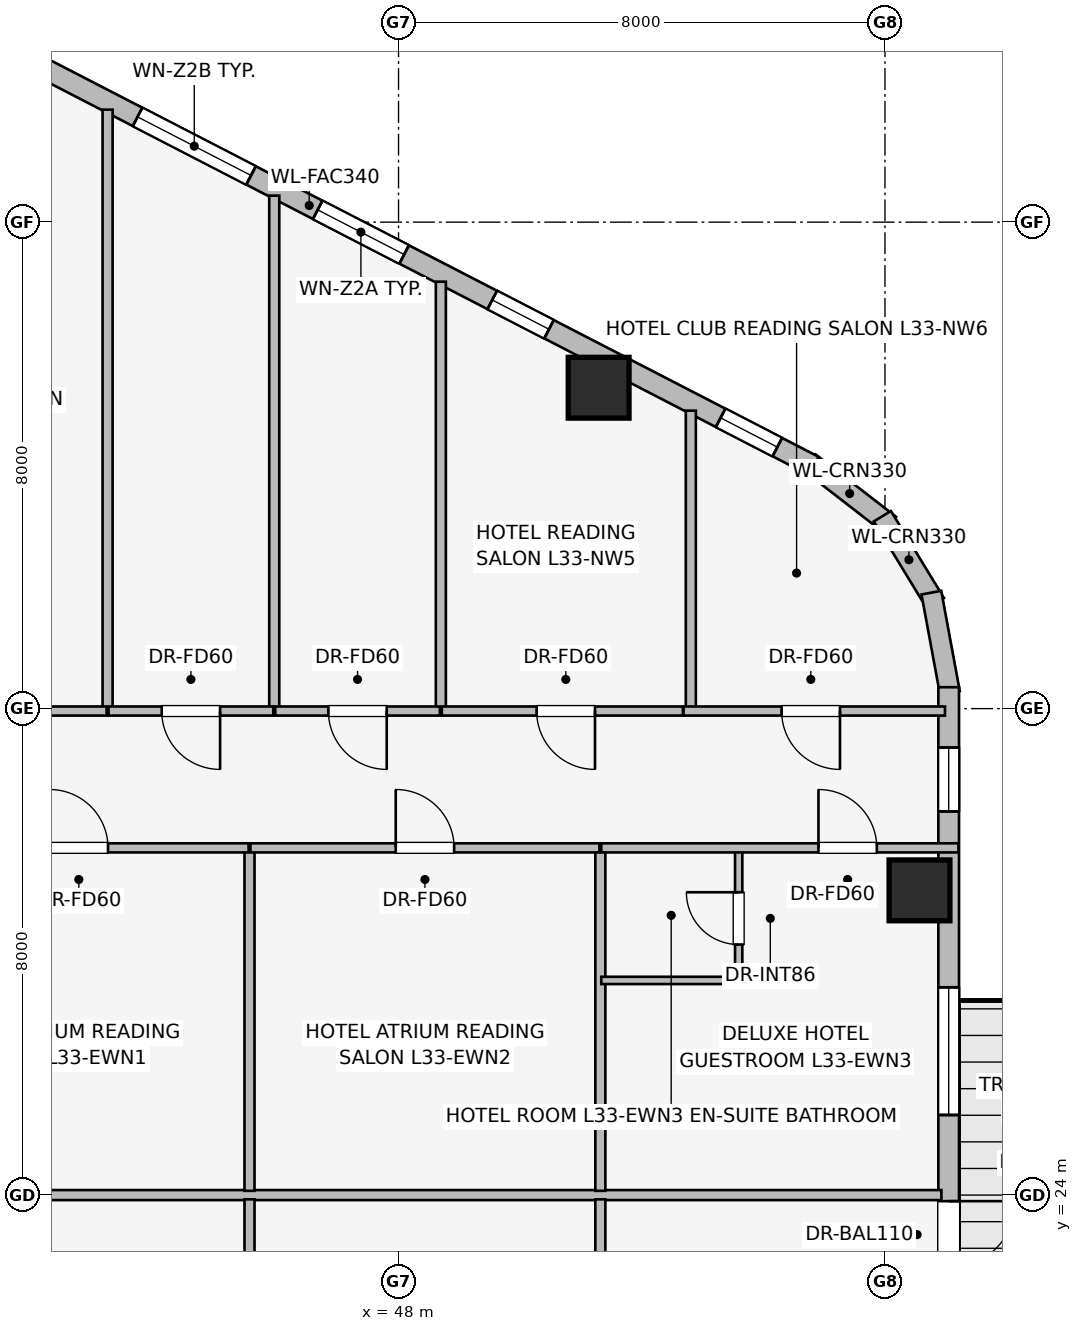
"""IFC4 building model, lengths in metres.
Left out: names, types, materials, properties, quantities, classifications, styles, units other than length and angle.
Written with IfcOpenShell. Run it as: python <this file> out.ifc"""

import sys

from ifc_helpers import new_model, si_unit, direction, frame, frame_2d, origin, origin_2d, place, context, subcontext, project, spatial, rectangle, extrude, element, fill, save


model = new_model("IFC4")
c1 = context("Model", 3, precision=1e-05, world=origin(), true_north=direction((0.0, 1.0)))
c2 = subcontext(c1, "Body", "Model", "MODEL_VIEW")
j1 = project(units=[si_unit("LENGTHUNIT", "METRE"), si_unit("PLANEANGLEUNIT", "RADIAN")], contexts=[c1])
p1 = place(None, origin())
s1 = spatial("IfcSite", under=j1, at=p1, CompositionType="ELEMENT")
p2 = place(p1, origin())
s2 = spatial("IfcBuilding", under=s1, at=p2, CompositionType="ELEMENT")
p3 = place(p2, frame((0.0, 0.0, 125.7)))
s3 = spatial("IfcBuildingStorey", under=s2, at=p3, CompositionType="ELEMENT", Elevation=125.7)
for number, where, z_axis, x_axis in (
    (1, (51.291, 37.277, 0.0), (0.0, 0.0, 1.0), (1.0, 0.0, 0.0)),
    (2, (56.568, 29.011, 0.0), (0.0, 0.0, 1.0), (1.0, 0.0, 0.0)),
):
    element("IfcColumn", number, at=place(p3, frame(where, z_axis=z_axis, x_axis=x_axis)), inside=s3, PredefinedType="COLUMN", context=c2, shape_type="SweptSolid", body=[
        extrude(rectangle(XDim=1.0, YDim=1.0, at=origin_2d()), origin(), (0.0, 0.0, 1.0), 3.45),
    ])
p4 = place(p3, frame((54.757, 36.05, 0.0), z_axis=(0.0, 0.0, 1.0), x_axis=(0.790621329885, -0.612305408053, 0.0)))
e3 = element("IfcWall", 3, at=p4, inside=s3, PredefinedType="STANDARD", context=c2, shape_type="SweptSolid", body=[
    extrude(rectangle(XDim=1.676, YDim=0.33, at=frame_2d((0.838, 0.0))), origin(), (0.0, 0.0, 1.0), 3.19),
])
p5 = place(p3, frame((55.957, 35.164, 0.0), z_axis=(0.0, 0.0, 1.0), x_axis=(0.520519429557, -0.853849824883, 0.0)))
e4 = element("IfcWall", 4, at=p5, inside=s3, PredefinedType="STANDARD", context=c2, shape_type="SweptSolid", body=[
    extrude(rectangle(XDim=1.677, YDim=0.33, at=frame_2d((0.839, 0.0))), origin(), (0.0, 0.0, 1.0), 3.19),
])
p6 = place(p3, frame((56.763, 33.907, 0.0), z_axis=(0.0, 0.0, 1.0), x_axis=(0.181984991895, -0.983301308209, 0.0)))
e5 = element("IfcWall", 5, at=p6, inside=s3, PredefinedType="STANDARD", context=c2, shape_type="SweptSolid", body=[
    extrude(rectangle(XDim=1.677, YDim=0.33, at=frame_2d((0.838, 0.0))), origin(), (0.0, 0.0, 1.0), 3.19),
])
p7 = place(p3, frame((38.231, 44.558, 0.0), z_axis=(0.0, 0.0, 1.0), x_axis=(0.888613612362, -0.458656568606, 0.0)))
e6 = element("IfcWall", 6, at=p7, inside=s3, PredefinedType="STANDARD", context=c2, shape_type="SweptSolid", body=[
    extrude(rectangle(XDim=18.681, YDim=0.34, at=frame_2d((9.34, 0.0))), origin(), (0.0, 0.0, 1.0), 3.19),
])
p8 = place(p7, frame((1.727, 0.0, 0.75)))
e7 = element("IfcOpeningElement", 7, at=p8, cuts=e6, PredefinedType="OPENING", context=c2, shape_type="SweptSolid", body=[
    extrude(rectangle(XDim=1.05, YDim=1.4, at=frame_2d((0.525, 0.7))), frame((0.0, 0.18, 0.0), z_axis=(0.0, -1.0, 0.0), x_axis=(1.0, 0.0, 0.0)), (0.0, 0.0, 1.0), 0.36),
])
p9 = place(p7, frame((6.163, 0.0, 0.75)))
e8 = element("IfcOpeningElement", 8, at=p9, cuts=e6, PredefinedType="OPENING", context=c2, shape_type="SweptSolid", body=[
    extrude(rectangle(XDim=2.1, YDim=1.5, at=frame_2d((1.05, 0.75))), frame((0.0, 0.18, 0.0), z_axis=(0.0, -1.0, 0.0), x_axis=(1.0, 0.0, 0.0)), (0.0, 0.0, 1.0), 0.36),
])
p10 = place(p7, frame((9.497, 0.0, 0.75)))
e9 = element("IfcOpeningElement", 9, at=p10, cuts=e6, PredefinedType="OPENING", context=c2, shape_type="SweptSolid", body=[
    extrude(rectangle(XDim=1.6, YDim=1.55, at=frame_2d((0.8, 0.775))), frame((0.0, 0.18, 0.0), z_axis=(0.0, -1.0, 0.0), x_axis=(1.0, 0.0, 0.0)), (0.0, 0.0, 1.0), 0.36),
])
p11 = place(p7, frame((12.728, 0.0, 0.75)))
e10 = element("IfcOpeningElement", 10, at=p11, cuts=e6, PredefinedType="OPENING", context=c2, shape_type="SweptSolid", body=[
    extrude(rectangle(XDim=1.05, YDim=1.4, at=frame_2d((0.525, 0.7))), frame((0.0, 0.18, 0.0), z_axis=(0.0, -1.0, 0.0), x_axis=(1.0, 0.0, 0.0)), (0.0, 0.0, 1.0), 0.36),
])
p12 = place(p7, frame((16.954, 0.0, 0.75)))
e11 = element("IfcOpeningElement", 11, at=p12, cuts=e6, PredefinedType="OPENING", context=c2, shape_type="SweptSolid", body=[
    extrude(rectangle(XDim=1.05, YDim=1.4, at=frame_2d((0.525, 0.7))), frame((0.0, 0.18, 0.0), z_axis=(0.0, -1.0, 0.0), x_axis=(1.0, 0.0, 0.0)), (0.0, 0.0, 1.0), 0.36),
])
p13 = place(p3, frame((57.048, 32.352, 0.0), z_axis=(0.0, 0.0, 1.0), x_axis=(0.0, -1.0, 0.0)))
e12 = element("IfcWall", 12, at=p13, inside=s3, PredefinedType="STANDARD", context=c2, shape_type="SweptSolid", body=[
    extrude(rectangle(XDim=16.704, YDim=0.34, at=frame_2d((8.352, 0.0))), origin(), (0.0, 0.0, 1.0), 3.19),
])
p14 = place(p13, frame((8.452, 0.0, 0.0)))
e13 = element("IfcOpeningElement", 13, at=p14, cuts=e12, PredefinedType="OPENING", context=c2, shape_type="SweptSolid", body=[
    extrude(rectangle(XDim=1.1, YDim=2.04, at=frame_2d((0.55, 1.02))), frame((0.0, 0.18, 0.0), z_axis=(0.0, -1.0, 0.0), x_axis=(1.0, 0.0, 0.0)), (0.0, 0.0, 1.0), 0.36),
])
p15 = place(p13, frame((0.992, 0.0, 0.75)))
e14 = element("IfcOpeningElement", 14, at=p15, cuts=e12, PredefinedType="OPENING", context=c2, shape_type="SweptSolid", body=[
    extrude(rectangle(XDim=1.05, YDim=1.4, at=frame_2d((0.525, 0.7))), frame((0.0, 0.18, 0.0), z_axis=(0.0, -1.0, 0.0), x_axis=(1.0, 0.0, 0.0)), (0.0, 0.0, 1.0), 0.36),
])
p16 = place(p13, frame((4.935, 0.0, 0.75)))
e15 = element("IfcOpeningElement", 15, at=p16, cuts=e12, PredefinedType="OPENING", context=c2, shape_type="SweptSolid", body=[
    extrude(rectangle(XDim=2.1, YDim=1.5, at=frame_2d((1.05, 0.75))), frame((0.0, 0.18, 0.0), z_axis=(0.0, -1.0, 0.0), x_axis=(1.0, 0.0, 0.0)), (0.0, 0.0, 1.0), 0.36),
])
p17 = place(p13, frame((10.497, 0.0, 0.75)))
e16 = element("IfcOpeningElement", 16, at=p17, cuts=e12, PredefinedType="OPENING", context=c2, shape_type="SweptSolid", body=[
    extrude(rectangle(XDim=1.6, YDim=1.55, at=frame_2d((0.8, 0.775))), frame((0.0, 0.18, 0.0), z_axis=(0.0, -1.0, 0.0), x_axis=(1.0, 0.0, 0.0)), (0.0, 0.0, 1.0), 0.36),
])
p18 = place(p13, frame((14.702, 0.0, 0.75)))
e17 = element("IfcOpeningElement", 17, at=p18, cuts=e12, PredefinedType="OPENING", context=c2, shape_type="SweptSolid", body=[
    extrude(rectangle(XDim=1.05, YDim=1.4, at=frame_2d((0.525, 0.7))), frame((0.0, 0.18, 0.0), z_axis=(0.0, -1.0, 0.0), x_axis=(1.0, 0.0, 0.0)), (0.0, 0.0, 1.0), 0.36),
])
p19 = place(p3, frame((43.215, 31.97, 0.0), z_axis=(0.0, 0.0, 1.0), x_axis=(0.0, 1.0, 0.0)))
e18 = element("IfcWall", 18, at=p19, inside=s3, PredefinedType="PARTITIONING", context=c2, shape_type="SweptSolid", body=[
    extrude(rectangle(XDim=9.88, YDim=0.165, at=frame_2d((4.94, 0.0))), origin(), (0.0, 0.0, 1.0), 3.19),
])
p20 = place(p3, frame((45.956, 31.97, 0.0), z_axis=(0.0, 0.0, 1.0), x_axis=(0.0, 1.0, 0.0)))
e19 = element("IfcWall", 19, at=p20, inside=s3, PredefinedType="PARTITIONING", context=c2, shape_type="SweptSolid", body=[
    extrude(rectangle(XDim=8.466, YDim=0.165, at=frame_2d((4.233, 0.0))), origin(), (0.0, 0.0, 1.0), 3.19),
])
p21 = place(p3, frame((48.696, 31.97, 0.0), z_axis=(0.0, 0.0, 1.0), x_axis=(0.0, 1.0, 0.0)))
e20 = element("IfcWall", 20, at=p21, inside=s3, PredefinedType="PARTITIONING", context=c2, shape_type="SweptSolid", body=[
    extrude(rectangle(XDim=7.051, YDim=0.165, at=frame_2d((3.525, 0.0))), origin(), (0.0, 0.0, 1.0), 3.19),
])
p22 = place(p3, frame((52.807, 31.97, 0.0), z_axis=(0.0, 0.0, 1.0), x_axis=(0.0, 1.0, 0.0)))
e21 = element("IfcWall", 21, at=p22, inside=s3, PredefinedType="PARTITIONING", context=c2, shape_type="SweptSolid", body=[
    extrude(rectangle(XDim=4.93, YDim=0.165, at=frame_2d((2.465, 0.0))), origin(), (0.0, 0.0, 1.0), 3.19),
])
p23 = place(p3, frame((43.199, 31.96, 0.0), z_axis=(0.0, 0.0, 1.0), x_axis=(-1.0, 0.0, 0.0)))
e22 = element("IfcWall", 22, at=p23, inside=s3, PredefinedType="PARTITIONING", context=c2, shape_type="SweptSolid", body=[
    extrude(rectangle(XDim=3.965, YDim=0.15, at=frame_2d((1.982, 0.0))), origin(), (0.0, 0.0, 1.0), 3.19),
])
p24 = place(p23, frame((1.56, 0.0, 0.0)))
e23 = element("IfcOpeningElement", 23, at=p24, cuts=e22, PredefinedType="OPENING", context=c2, shape_type="SweptSolid", body=[
    extrude(rectangle(XDim=0.96, YDim=2.0, at=frame_2d((0.48, 1.0))), frame((0.0, 0.085, 0.0), z_axis=(0.0, -1.0, 0.0), x_axis=(1.0, 0.0, 0.0)), (0.0, 0.0, 1.0), 0.17),
])
p25 = place(p3, frame((45.94, 31.96, 0.0), z_axis=(0.0, 0.0, 1.0), x_axis=(-1.0, 0.0, 0.0)))
e24 = element("IfcWall", 24, at=p25, inside=s3, PredefinedType="PARTITIONING", context=c2, shape_type="SweptSolid", body=[
    extrude(rectangle(XDim=2.709, YDim=0.15, at=frame_2d((1.354, 0.0))), origin(), (0.0, 0.0, 1.0), 3.19),
])
p26 = place(p25, frame((0.875, 0.0, 0.0)))
e25 = element("IfcOpeningElement", 25, at=p26, cuts=e24, PredefinedType="OPENING", context=c2, shape_type="SweptSolid", body=[
    extrude(rectangle(XDim=0.96, YDim=2.0, at=frame_2d((0.48, 1.0))), frame((0.0, 0.085, 0.0), z_axis=(0.0, -1.0, 0.0), x_axis=(1.0, 0.0, 0.0)), (0.0, 0.0, 1.0), 0.17),
])
p27 = place(p3, frame((48.68, 31.96, 0.0), z_axis=(0.0, 0.0, 1.0), x_axis=(-1.0, 0.0, 0.0)))
e26 = element("IfcWall", 26, at=p27, inside=s3, PredefinedType="PARTITIONING", context=c2, shape_type="SweptSolid", body=[
    extrude(rectangle(XDim=2.708, YDim=0.15, at=frame_2d((1.354, 0.0))), origin(), (0.0, 0.0, 1.0), 3.19),
])
p28 = place(p27, frame((0.874, 0.0, 0.0)))
e27 = element("IfcOpeningElement", 27, at=p28, cuts=e26, PredefinedType="OPENING", context=c2, shape_type="SweptSolid", body=[
    extrude(rectangle(XDim=0.96, YDim=2.0, at=frame_2d((0.48, 1.0))), frame((0.0, 0.085, 0.0), z_axis=(0.0, -1.0, 0.0), x_axis=(1.0, 0.0, 0.0)), (0.0, 0.0, 1.0), 0.17),
])
p29 = place(p3, frame((52.677, 31.96, 0.0), z_axis=(0.0, 0.0, 1.0), x_axis=(-1.0, 0.0, 0.0)))
e28 = element("IfcWall", 28, at=p29, inside=s3, PredefinedType="PARTITIONING", context=c2, shape_type="SweptSolid", body=[
    extrude(rectangle(XDim=3.965, YDim=0.15, at=frame_2d((1.982, 0.0))), origin(), (0.0, 0.0, 1.0), 3.19),
])
p30 = place(p29, frame((1.446, 0.0, 0.0)))
e29 = element("IfcOpeningElement", 29, at=p30, cuts=e28, PredefinedType="OPENING", context=c2, shape_type="SweptSolid", body=[
    extrude(rectangle(XDim=0.96, YDim=2.0, at=frame_2d((0.48, 1.0))), frame((0.0, 0.085, 0.0), z_axis=(0.0, -1.0, 0.0), x_axis=(1.0, 0.0, 0.0)), (0.0, 0.0, 1.0), 0.17),
])
p31 = place(p3, frame((56.987, 31.96, 0.0), z_axis=(0.0, 0.0, 1.0), x_axis=(-1.0, 0.0, 0.0)))
e30 = element("IfcWall", 30, at=p31, inside=s3, PredefinedType="PARTITIONING", context=c2, shape_type="SweptSolid", body=[
    extrude(rectangle(XDim=4.3, YDim=0.15, at=frame_2d((2.15, 0.0))), origin(), (0.0, 0.0, 1.0), 3.19),
])
p32 = place(p31, frame((1.727, 0.0, 0.0)))
e31 = element("IfcOpeningElement", 31, at=p32, cuts=e30, PredefinedType="OPENING", context=c2, shape_type="SweptSolid", body=[
    extrude(rectangle(XDim=0.96, YDim=2.0, at=frame_2d((0.48, 1.0))), frame((0.0, 0.085, 0.0), z_axis=(0.0, -1.0, 0.0), x_axis=(1.0, 0.0, 0.0)), (0.0, 0.0, 1.0), 0.17),
])
p33 = place(p3, frame((40.52, 24.0, 0.0), z_axis=(0.0, 0.0, 1.0), x_axis=(1.0, 0.0, 0.0)))
e32 = element("IfcWall", 32, at=p33, inside=s3, PredefinedType="PARTITIONING", context=c2, shape_type="SweptSolid", body=[
    extrude(rectangle(XDim=16.408, YDim=0.165, at=frame_2d((8.204, 0.0))), origin(), (0.0, 0.0, 1.0), 3.19),
])
for number, where, z_axis, x_axis in (
    (33, (45.549, 24.07, 0.0), (0.0, 0.0, 1.0), (0.0, 1.0, 0.0)),
    (34, (51.319, 24.07, 0.0), (0.0, 0.0, 1.0), (0.0, 1.0, 0.0)),
):
    element("IfcWall", number, at=place(p3, frame(where, z_axis=z_axis, x_axis=x_axis)), inside=s3, PredefinedType="PARTITIONING", context=c2, shape_type="SweptSolid", body=[
        extrude(rectangle(XDim=5.64, YDim=0.165, at=frame_2d((2.82, 0.0))), origin(), (0.0, 0.0, 1.0), 3.19),
    ])
p34 = place(p3, frame((39.95, 29.71, 0.0), z_axis=(0.0, 0.0, 1.0), x_axis=(1.0, 0.0, 0.0)))
e35 = element("IfcWall", 35, at=p34, inside=s3, PredefinedType="PARTITIONING", context=c2, shape_type="SweptSolid", body=[
    extrude(rectangle(XDim=5.584, YDim=0.15, at=frame_2d((2.792, 0.0))), origin(), (0.0, 0.0, 1.0), 3.19),
])
p35 = place(p34, frame((2.312, 0.0, 0.0)))
e36 = element("IfcOpeningElement", 36, at=p35, cuts=e35, PredefinedType="OPENING", context=c2, shape_type="SweptSolid", body=[
    extrude(rectangle(XDim=0.96, YDim=2.0, at=frame_2d((0.48, 1.0))), frame((0.0, 0.085, 0.0), z_axis=(0.0, -1.0, 0.0), x_axis=(1.0, 0.0, 0.0)), (0.0, 0.0, 1.0), 0.17),
])
p36 = place(p3, frame((45.564, 29.71, 0.0), z_axis=(0.0, 0.0, 1.0), x_axis=(1.0, 0.0, 0.0)))
e37 = element("IfcWall", 37, at=p36, inside=s3, PredefinedType="PARTITIONING", context=c2, shape_type="SweptSolid", body=[
    extrude(rectangle(XDim=5.74, YDim=0.15, at=frame_2d((2.87, 0.0))), origin(), (0.0, 0.0, 1.0), 3.19),
])
p37 = place(p36, frame((2.39, 0.0, 0.0)))
e38 = element("IfcOpeningElement", 38, at=p37, cuts=e37, PredefinedType="OPENING", context=c2, shape_type="SweptSolid", body=[
    extrude(rectangle(XDim=0.96, YDim=2.0, at=frame_2d((0.48, 1.0))), frame((0.0, 0.085, 0.0), z_axis=(0.0, -1.0, 0.0), x_axis=(1.0, 0.0, 0.0)), (0.0, 0.0, 1.0), 0.17),
])
p38 = place(p3, frame((53.594, 27.47, 0.0), z_axis=(0.0, 0.0, 1.0), x_axis=(0.0, 1.0, 0.0)))
e39 = element("IfcWall", 39, at=p38, inside=s3, PredefinedType="PARTITIONING", context=c2, shape_type="SweptSolid", body=[
    extrude(rectangle(XDim=2.24, YDim=0.12, at=frame_2d((1.12, 0.0))), origin(), (0.0, 0.0, 1.0), 3.19),
])
p39 = place(p38, frame((0.65, 0.0, 0.0)))
e40 = element("IfcOpeningElement", 40, at=p39, cuts=e39, PredefinedType="OPENING", context=c2, shape_type="SweptSolid", body=[
    extrude(rectangle(XDim=0.86, YDim=2.0, at=frame_2d((0.43, 1.0))), frame((0.0, 0.07, 0.0), z_axis=(0.0, -1.0, 0.0), x_axis=(1.0, 0.0, 0.0)), (0.0, 0.0, 1.0), 0.14),
])
p40 = place(p3, frame((51.334, 27.53, 0.0), z_axis=(0.0, 0.0, 1.0), x_axis=(1.0, 0.0, 0.0)))
e41 = element("IfcWall", 41, at=p40, inside=s3, PredefinedType="PARTITIONING", context=c2, shape_type="SweptSolid", body=[
    extrude(rectangle(XDim=2.32, YDim=0.12, at=frame_2d((1.16, 0.0))), origin(), (0.0, 0.0, 1.0), 3.19),
])
p41 = place(p3, frame((51.334, 29.71, 0.0), z_axis=(0.0, 0.0, 1.0), x_axis=(1.0, 0.0, 0.0)))
e42 = element("IfcWall", 42, at=p41, inside=s3, PredefinedType="PARTITIONING", context=c2, shape_type="SweptSolid", body=[
    extrude(rectangle(XDim=5.874, YDim=0.15, at=frame_2d((2.937, 0.0))), origin(), (0.0, 0.0, 1.0), 3.19),
])
p42 = place(p41, frame((3.572, 0.0, 0.0)))
e43 = element("IfcOpeningElement", 43, at=p42, cuts=e42, PredefinedType="OPENING", context=c2, shape_type="SweptSolid", body=[
    extrude(rectangle(XDim=0.96, YDim=2.0, at=frame_2d((0.48, 1.0))), frame((0.0, 0.085, 0.0), z_axis=(0.0, -1.0, 0.0), x_axis=(1.0, 0.0, 0.0)), (0.0, 0.0, 1.0), 0.17),
])
for number, where, z_axis, x_axis in (
    (44, (45.549, 18.29, 0.0), (0.0, 0.0, 1.0), (0.0, 1.0, 0.0)),
    (45, (51.319, 18.29, 0.0), (0.0, 0.0, 1.0), (0.0, 1.0, 0.0)),
):
    element("IfcWall", number, at=place(p3, frame(where, z_axis=z_axis, x_axis=x_axis)), inside=s3, PredefinedType="PARTITIONING", context=c2, shape_type="SweptSolid", body=[
        extrude(rectangle(XDim=5.64, YDim=0.165, at=frame_2d((2.82, 0.0))), origin(), (0.0, 0.0, 1.0), 3.19),
    ])
p43 = place(p9, origin())
e46 = element("IfcWindow", 46, at=p43, inside=s3, PartitioningType="SINGLE_PANEL", PredefinedType="WINDOW", context=c2, shape_type="SweptSolid", body=[
    extrude(rectangle(XDim=2.1, YDim=1.5, at=frame_2d((1.05, 0.75))), frame((0.0, 0.03, 0.0), z_axis=(0.0, -1.0, 0.0), x_axis=(1.0, 0.0, 0.0)), (0.0, 0.0, 1.0), 0.06),
])
fill(e8, e46)
p44 = place(p10, origin())
e47 = element("IfcWindow", 47, at=p44, inside=s3, PartitioningType="SINGLE_PANEL", PredefinedType="WINDOW", context=c2, shape_type="SweptSolid", body=[
    extrude(rectangle(XDim=1.6, YDim=1.55, at=frame_2d((0.8, 0.775))), frame((0.0, 0.03, 0.0), z_axis=(0.0, -1.0, 0.0), x_axis=(1.0, 0.0, 0.0)), (0.0, 0.0, 1.0), 0.06),
])
fill(e9, e47)
p45 = place(p11, origin())
e48 = element("IfcWindow", 48, at=p45, inside=s3, PartitioningType="SINGLE_PANEL", PredefinedType="WINDOW", context=c2, shape_type="SweptSolid", body=[
    extrude(rectangle(XDim=1.05, YDim=1.4, at=frame_2d((0.525, 0.7))), frame((0.0, 0.03, 0.0), z_axis=(0.0, -1.0, 0.0), x_axis=(1.0, 0.0, 0.0)), (0.0, 0.0, 1.0), 0.06),
])
fill(e10, e48)
p46 = place(p12, origin())
e49 = element("IfcWindow", 49, at=p46, inside=s3, PartitioningType="SINGLE_PANEL", PredefinedType="WINDOW", context=c2, shape_type="SweptSolid", body=[
    extrude(rectangle(XDim=1.05, YDim=1.4, at=frame_2d((0.525, 0.7))), frame((0.0, 0.03, 0.0), z_axis=(0.0, -1.0, 0.0), x_axis=(1.0, 0.0, 0.0)), (0.0, 0.0, 1.0), 0.06),
])
fill(e11, e49)
p47 = place(p14, origin())
e50 = element("IfcDoor", 50, at=p47, inside=s3, OperationType="SINGLE_SWING_LEFT", PredefinedType="DOOR", context=c2, shape_type="SweptSolid", body=[
    extrude(rectangle(XDim=1.1, YDim=2.04, at=frame_2d((0.55, 1.02))), frame((0.0, 0.025, 0.0), z_axis=(0.0, -1.0, 0.0), x_axis=(1.0, 0.0, 0.0)), (0.0, 0.0, 1.0), 0.05),
])
fill(e13, e50)
p48 = place(p15, origin())
e51 = element("IfcWindow", 51, at=p48, inside=s3, PartitioningType="SINGLE_PANEL", PredefinedType="WINDOW", context=c2, shape_type="SweptSolid", body=[
    extrude(rectangle(XDim=1.05, YDim=1.4, at=frame_2d((0.525, 0.7))), frame((0.0, 0.03, 0.0), z_axis=(0.0, -1.0, 0.0), x_axis=(1.0, 0.0, 0.0)), (0.0, 0.0, 1.0), 0.06),
])
fill(e14, e51)
p49 = place(p16, origin())
e52 = element("IfcWindow", 52, at=p49, inside=s3, PartitioningType="SINGLE_PANEL", PredefinedType="WINDOW", context=c2, shape_type="SweptSolid", body=[
    extrude(rectangle(XDim=2.1, YDim=1.5, at=frame_2d((1.05, 0.75))), frame((0.0, 0.03, 0.0), z_axis=(0.0, -1.0, 0.0), x_axis=(1.0, 0.0, 0.0)), (0.0, 0.0, 1.0), 0.06),
])
fill(e15, e52)
p50 = place(p26, origin())
e53 = element("IfcDoor", 53, at=p50, inside=s3, OperationType="SINGLE_SWING_LEFT", PredefinedType="DOOR", context=c2, shape_type="SweptSolid", body=[
    extrude(rectangle(XDim=0.96, YDim=2.0, at=frame_2d((0.48, 1.0))), frame((0.0, 0.025, 0.0), z_axis=(0.0, -1.0, 0.0), x_axis=(1.0, 0.0, 0.0)), (0.0, 0.0, 1.0), 0.05),
])
fill(e25, e53)
p51 = place(p28, origin())
e54 = element("IfcDoor", 54, at=p51, inside=s3, OperationType="SINGLE_SWING_LEFT", PredefinedType="DOOR", context=c2, shape_type="SweptSolid", body=[
    extrude(rectangle(XDim=0.96, YDim=2.0, at=frame_2d((0.48, 1.0))), frame((0.0, 0.025, 0.0), z_axis=(0.0, -1.0, 0.0), x_axis=(1.0, 0.0, 0.0)), (0.0, 0.0, 1.0), 0.05),
])
fill(e27, e54)
p52 = place(p30, origin())
e55 = element("IfcDoor", 55, at=p52, inside=s3, OperationType="SINGLE_SWING_LEFT", PredefinedType="DOOR", context=c2, shape_type="SweptSolid", body=[
    extrude(rectangle(XDim=0.96, YDim=2.0, at=frame_2d((0.48, 1.0))), frame((0.0, 0.025, 0.0), z_axis=(0.0, -1.0, 0.0), x_axis=(1.0, 0.0, 0.0)), (0.0, 0.0, 1.0), 0.05),
])
fill(e29, e55)
p53 = place(p32, origin())
e56 = element("IfcDoor", 56, at=p53, inside=s3, OperationType="SINGLE_SWING_LEFT", PredefinedType="DOOR", context=c2, shape_type="SweptSolid", body=[
    extrude(rectangle(XDim=0.96, YDim=2.0, at=frame_2d((0.48, 1.0))), frame((0.0, 0.025, 0.0), z_axis=(0.0, -1.0, 0.0), x_axis=(1.0, 0.0, 0.0)), (0.0, 0.0, 1.0), 0.05),
])
fill(e31, e56)
p54 = place(p35, origin())
e57 = element("IfcDoor", 57, at=p54, inside=s3, OperationType="SINGLE_SWING_LEFT", PredefinedType="DOOR", context=c2, shape_type="SweptSolid", body=[
    extrude(rectangle(XDim=0.96, YDim=2.0, at=frame_2d((0.48, 1.0))), frame((0.0, 0.025, 0.0), z_axis=(0.0, -1.0, 0.0), x_axis=(1.0, 0.0, 0.0)), (0.0, 0.0, 1.0), 0.05),
])
fill(e36, e57)
p55 = place(p37, origin())
e58 = element("IfcDoor", 58, at=p55, inside=s3, OperationType="SINGLE_SWING_LEFT", PredefinedType="DOOR", context=c2, shape_type="SweptSolid", body=[
    extrude(rectangle(XDim=0.96, YDim=2.0, at=frame_2d((0.48, 1.0))), frame((0.0, 0.025, 0.0), z_axis=(0.0, -1.0, 0.0), x_axis=(1.0, 0.0, 0.0)), (0.0, 0.0, 1.0), 0.05),
])
fill(e38, e58)
p56 = place(p39, origin())
e59 = element("IfcDoor", 59, at=p56, inside=s3, OperationType="SINGLE_SWING_RIGHT", PredefinedType="DOOR", context=c2, shape_type="SweptSolid", body=[
    extrude(rectangle(XDim=0.86, YDim=2.0, at=frame_2d((0.43, 1.0))), frame((0.0, 0.025, 0.0), z_axis=(0.0, -1.0, 0.0), x_axis=(1.0, 0.0, 0.0)), (0.0, 0.0, 1.0), 0.05),
])
fill(e40, e59)
p57 = place(p42, origin())
e60 = element("IfcDoor", 60, at=p57, inside=s3, OperationType="SINGLE_SWING_LEFT", PredefinedType="DOOR", context=c2, shape_type="SweptSolid", body=[
    extrude(rectangle(XDim=0.96, YDim=2.0, at=frame_2d((0.48, 1.0))), frame((0.0, 0.025, 0.0), z_axis=(0.0, -1.0, 0.0), x_axis=(1.0, 0.0, 0.0)), (0.0, 0.0, 1.0), 0.05),
])
fill(e43, e60)
save(model, sys.argv[1])
